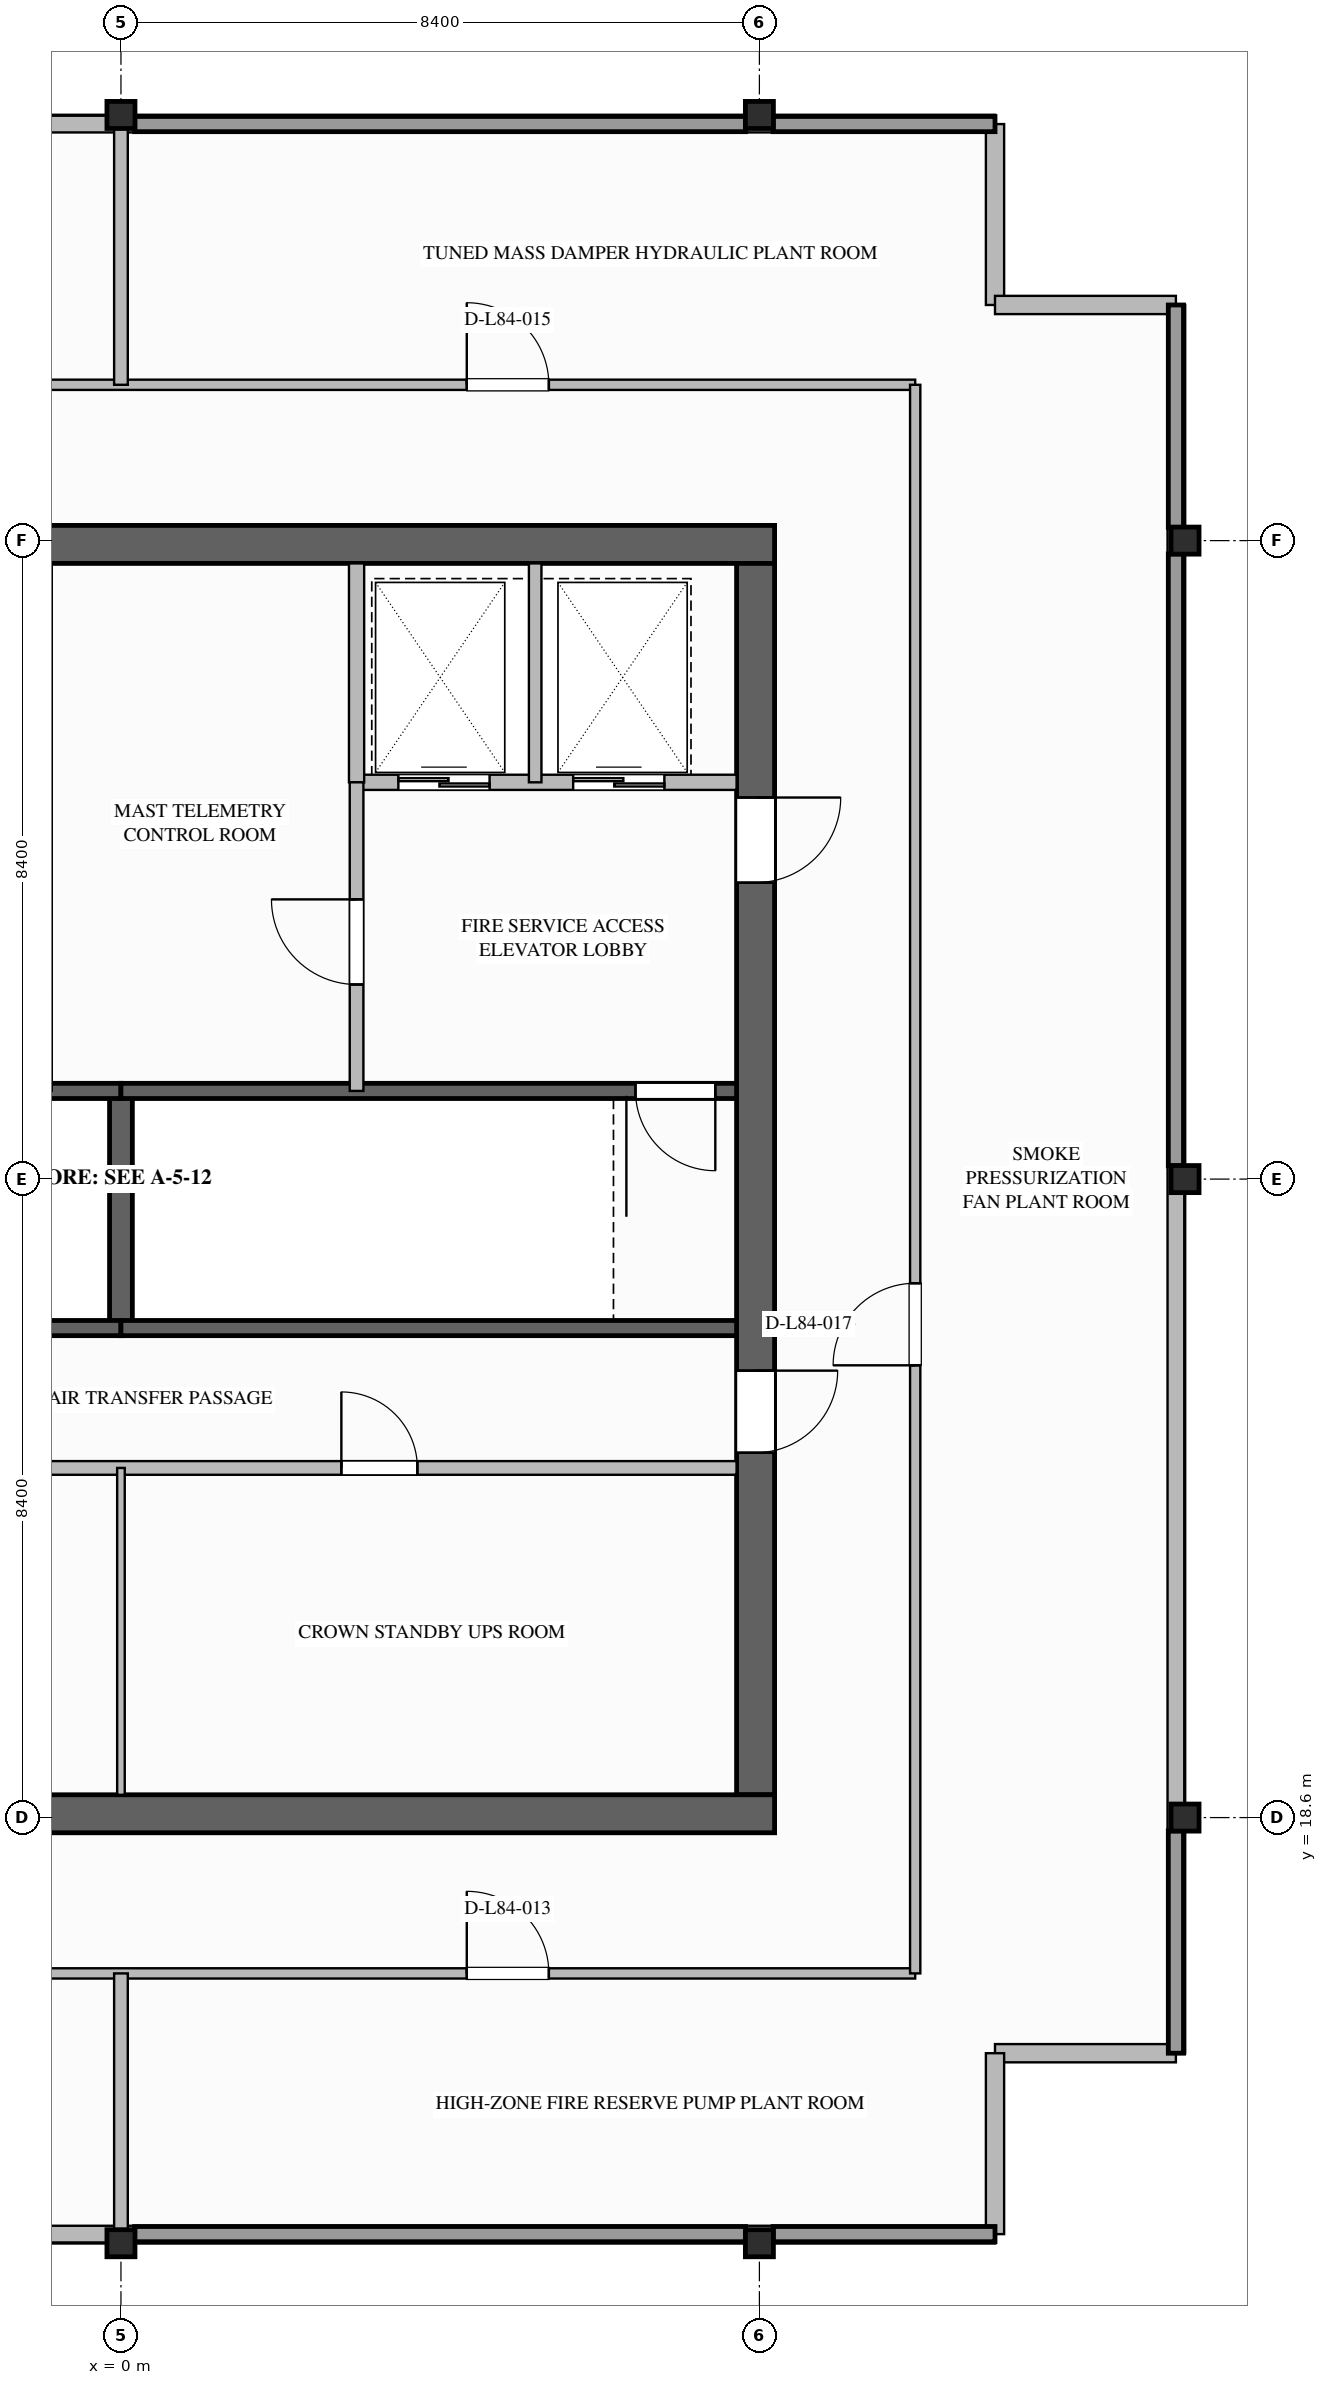
"""IFC4 building model, lengths in metres.
Left out: names, types, materials, properties, quantities, classifications, styles, units other than length and angle.
Written with IfcOpenShell. Run it as: python <this file> out.ifc"""

import sys

from ifc_helpers import new_model, si_unit, direction, frame, frame_2d, origin, origin_2d, place, context, subcontext, project, spatial, rectangle, i_section, extrude, element, fill, save


model = new_model("IFC4")
c1 = context("Model", 3, precision=1e-05, world=origin(), true_north=direction((0.0, 1.0)))
c2 = subcontext(c1, "Body", "Model", "MODEL_VIEW")
j1 = project(units=[si_unit("LENGTHUNIT", "METRE"), si_unit("PLANEANGLEUNIT", "RADIAN")], contexts=[c1])
p1 = place(None, origin())
s1 = spatial("IfcSite", under=j1, at=p1, CompositionType="ELEMENT")
p2 = place(p1, origin())
s2 = spatial("IfcBuilding", under=s1, at=p2, CompositionType="ELEMENT")
p3 = place(p2, frame((0.0, 0.0, 323.2)))
s3 = spatial("IfcBuildingStorey", under=s2, at=p3, CompositionType="ELEMENT", Elevation=323.2)
p4 = place(p3, frame((-8.6, 35.35, 0.0), z_axis=(0.0, 0.0, 1.0), x_axis=(1.0, 0.0, 0.0)))
e1 = element("IfcWall", 1, at=p4, inside=s3, PredefinedType="SHEAR", context=c2, shape_type="SweptSolid", body=[
    extrude(rectangle(XDim=17.2, YDim=0.5, at=frame_2d((8.6, 0.0))), origin(), (0.0, 0.0, 1.0), 3.42),
])
p5 = place(p3, frame((8.35, 35.1, 0.0), z_axis=(0.0, 0.0, 1.0), x_axis=(0.0, -1.0, 0.0)))
e2 = element("IfcWall", 2, at=p5, inside=s3, PredefinedType="SHEAR", context=c2, shape_type="SweptSolid", body=[
    extrude(rectangle(XDim=16.2, YDim=0.5, at=frame_2d((8.1, 0.0))), origin(), (0.0, 0.0, 1.0), 3.42),
])
p6 = place(p5, frame((3.08, 0.0, 0.0)))
e3 = element("IfcOpeningElement", 3, at=p6, cuts=e2, PredefinedType="OPENING", context=c2, shape_type="SweptSolid", body=[
    extrude(rectangle(XDim=1.12, YDim=2.1, at=frame_2d((0.56, 1.05))), frame((0.0, 0.26, 0.0), z_axis=(0.0, -1.0, 0.0), x_axis=(1.0, 0.0, 0.0)), (0.0, 0.0, 1.0), 0.52),
])
p7 = place(p5, frame((10.62, 0.0, 0.0)))
e4 = element("IfcOpeningElement", 4, at=p7, cuts=e2, PredefinedType="OPENING", context=c2, shape_type="SweptSolid", body=[
    extrude(rectangle(XDim=1.08, YDim=2.04, at=frame_2d((0.54, 1.02))), frame((0.0, 0.26, 0.0), z_axis=(0.0, -1.0, 0.0), x_axis=(1.0, 0.0, 0.0)), (0.0, 0.0, 1.0), 0.52),
])
p8 = place(p3, frame((8.6, 18.65, 0.0), z_axis=(0.0, 0.0, 1.0), x_axis=(-1.0, 0.0, 0.0)))
e5 = element("IfcWall", 5, at=p8, inside=s3, PredefinedType="SHEAR", context=c2, shape_type="SweptSolid", body=[
    extrude(rectangle(XDim=17.2, YDim=0.5, at=frame_2d((8.6, 0.0))), origin(), (0.0, 0.0, 1.0), 3.42),
])
for number, where, z_axis, x_axis in (
    (6, (14.0, 18.6, 0.0), (0.0, 0.0, 1.0), (1.0, 0.0, 0.0)),
    (7, (14.0, 27.0, 0.0), (0.0, 0.0, 1.0), (1.0, 0.0, 0.0)),
    (8, (14.0, 35.4, 0.0), (0.0, 0.0, 1.0), (1.0, 0.0, 0.0)),
    (9, (0.0, 13.0, 0.0), (0.0, 0.0, 1.0), (1.0, 0.0, 0.0)),
    (10, (8.4, 13.0, 0.0), (0.0, 0.0, 1.0), (1.0, 0.0, 0.0)),
    (11, (0.0, 41.0, 0.0), (0.0, 0.0, 1.0), (1.0, 0.0, 0.0)),
    (12, (8.4, 41.0, 0.0), (0.0, 0.0, 1.0), (1.0, 0.0, 0.0)),
):
    element("IfcColumn", number, at=place(p3, frame(where, z_axis=z_axis, x_axis=x_axis)), inside=s3, PredefinedType="COLUMN", context=c2, shape_type="SweptSolid", body=[
        extrude(i_section(OverallWidth=0.369, OverallDepth=0.356, WebThickness=0.011, FlangeThickness=0.018, FilletRadius=0.025, at=origin_2d()), origin(), (0.0, 0.0, 1.0), 3.42),
    ])
for number, where, z_axis, x_axis in (
    (13, (11.5, 40.88, 0.0), (0.0, 0.0, 1.0), (0.0, -1.0, 0.0)),
    (14, (11.5, 38.5, 0.0), (0.0, 0.0, 1.0), (1.0, 0.0, 0.0)),
    (15, (13.88, 15.5, 0.0), (0.0, 0.0, 1.0), (-1.0, 0.0, 0.0)),
    (16, (11.5, 15.5, 0.0), (0.0, 0.0, 1.0), (0.0, -1.0, 0.0)),
):
    element("IfcWall", number, at=place(p3, frame(where, z_axis=z_axis, x_axis=x_axis)), inside=s3, PredefinedType="STANDARD", context=c2, shape_type="SweptSolid", body=[
        extrude(rectangle(XDim=2.38, YDim=0.24, at=frame_2d((1.19, 0.0))), origin(), (0.0, 0.0, 1.0), 3.42),
    ])
for number, where, z_axis, x_axis in (
    (17, (11.5, 13.12, 3.8), (0.0, 0.0, 1.0), (-1.0, 0.0, 0.0)),
    (18, (-11.5, 40.88, 3.8), (0.0, 0.0, 1.0), (1.0, 0.0, 0.0)),
    (19, (13.88, 38.5, 3.8), (0.0, 0.0, 1.0), (0.0, -1.0, 0.0)),
):
    element("IfcWall", number, at=place(p3, frame(where, z_axis=z_axis, x_axis=x_axis)), inside=s3, PredefinedType="PARAPET", context=c2, shape_type="SweptSolid", body=[
        extrude(rectangle(XDim=23.0, YDim=0.22, at=frame_2d((11.5, 0.0))), origin(), (0.0, 0.0, 1.0), 0.95),
    ])
p9 = place(p3, frame((0.0, 25.04, 0.0), z_axis=(0.0, 0.0, 1.0), x_axis=(0.0, 1.0, 0.0)))
e20 = element("IfcWall", 20, at=p9, inside=s3, PredefinedType="SOLIDWALL", context=c2, shape_type="SweptSolid", body=[
    extrude(rectangle(XDim=3.12, YDim=0.3, at=frame_2d((1.56, 0.0))), origin(), (0.0, 0.0, 1.0), 3.42),
])
p10 = place(p3, frame((-8.1, 25.04, 0.0), z_axis=(0.0, 0.0, 1.0), x_axis=(1.0, 0.0, 0.0)))
e21 = element("IfcWall", 21, at=p10, inside=s3, PredefinedType="SOLIDWALL", context=c2, shape_type="SweptSolid", body=[
    extrude(rectangle(XDim=8.1, YDim=0.2, at=frame_2d((4.05, 0.0))), origin(), (0.0, 0.0, 1.0), 3.42),
])
p11 = place(p10, frame((0.28, 0.0, 0.0)))
e22 = element("IfcOpeningElement", 22, at=p11, cuts=e21, PredefinedType="OPENING", context=c2, shape_type="SweptSolid", body=[
    extrude(rectangle(XDim=1.05, YDim=2.1, at=frame_2d((0.525, 1.05))), frame((0.0, 0.11, 0.0), z_axis=(0.0, -1.0, 0.0), x_axis=(1.0, 0.0, 0.0)), (0.0, 0.0, 1.0), 0.22),
])
for number, where, z_axis, x_axis in (
    (23, (-8.1, 28.16, 0.0), (0.0, 0.0, 1.0), (1.0, 0.0, 0.0)),
    (24, (0.0, 25.04, 0.0), (0.0, 0.0, 1.0), (1.0, 0.0, 0.0)),
):
    element("IfcWall", number, at=place(p3, frame(where, z_axis=z_axis, x_axis=x_axis)), inside=s3, PredefinedType="SOLIDWALL", context=c2, shape_type="SweptSolid", body=[
        extrude(rectangle(XDim=8.1, YDim=0.2, at=frame_2d((4.05, 0.0))), origin(), (0.0, 0.0, 1.0), 3.42),
    ])
p12 = place(p3, frame((8.1, 28.16, 0.0), z_axis=(0.0, 0.0, 1.0), x_axis=(-1.0, 0.0, 0.0)))
e25 = element("IfcWall", 25, at=p12, inside=s3, PredefinedType="SOLIDWALL", context=c2, shape_type="SweptSolid", body=[
    extrude(rectangle(XDim=8.1, YDim=0.2, at=frame_2d((4.05, 0.0))), origin(), (0.0, 0.0, 1.0), 3.42),
])
p13 = place(p12, frame((0.28, 0.0, 0.0)))
e26 = element("IfcOpeningElement", 26, at=p13, cuts=e25, PredefinedType="OPENING", context=c2, shape_type="SweptSolid", body=[
    extrude(rectangle(XDim=1.05, YDim=2.1, at=frame_2d((0.525, 1.05))), frame((0.0, 0.11, 0.0), z_axis=(0.0, -1.0, 0.0), x_axis=(1.0, 0.0, 0.0)), (0.0, 0.0, 1.0), 0.22),
])
p14 = place(p3, frame((3.1, 32.22, 0.0), z_axis=(0.0, 0.0, 1.0), x_axis=(1.0, 0.0, 0.0)))
e27 = element("IfcWall", 27, at=p14, inside=s3, PredefinedType="SOLIDWALL", context=c2, shape_type="SweptSolid", body=[
    extrude(rectangle(XDim=5.0, YDim=0.2, at=frame_2d((2.5, 0.0))), origin(), (0.0, 0.0, 1.0), 3.42),
])
p15 = place(p14, frame((0.55, 0.0, 0.0)))
e28 = element("IfcOpeningElement", 28, at=p15, cuts=e27, PredefinedType="OPENING", context=c2, shape_type="SweptSolid", body=[
    extrude(rectangle(XDim=1.2, YDim=2.2, at=frame_2d((0.6, 1.1))), frame((0.0, 0.11, 0.0), z_axis=(0.0, -1.0, 0.0), x_axis=(1.0, 0.0, 0.0)), (0.0, 0.0, 1.0), 0.22),
])
p16 = place(p14, frame((2.85, 0.0, 0.0)))
e29 = element("IfcOpeningElement", 29, at=p16, cuts=e27, PredefinedType="OPENING", context=c2, shape_type="SweptSolid", body=[
    extrude(rectangle(XDim=1.2, YDim=2.2, at=frame_2d((0.6, 1.1))), frame((0.0, 0.11, 0.0), z_axis=(0.0, -1.0, 0.0), x_axis=(1.0, 0.0, 0.0)), (0.0, 0.0, 1.0), 0.22),
])
p17 = place(p3, frame((3.1, 32.22, 0.0), z_axis=(0.0, 0.0, 1.0), x_axis=(0.0, 1.0, 0.0)))
e30 = element("IfcWall", 30, at=p17, inside=s3, PredefinedType="SOLIDWALL", context=c2, shape_type="SweptSolid", body=[
    extrude(rectangle(XDim=2.88, YDim=0.2, at=frame_2d((1.44, 0.0))), origin(), (0.0, 0.0, 1.0), 3.42),
])
p18 = place(p3, frame((5.45, 32.22, 0.0), z_axis=(0.0, 0.0, 1.0), x_axis=(0.0, 1.0, 0.0)))
e31 = element("IfcWall", 31, at=p18, inside=s3, PredefinedType="PARTITIONING", context=c2, shape_type="SweptSolid", body=[
    extrude(rectangle(XDim=2.88, YDim=0.165, at=frame_2d((1.44, 0.0))), origin(), (0.0, 0.0, 1.0), 3.42),
])
p19 = place(p3, frame((3.1, 28.16, 0.0), z_axis=(0.0, 0.0, 1.0), x_axis=(0.0, 1.0, 0.0)))
e32 = element("IfcWall", 32, at=p19, inside=s3, PredefinedType="SOLIDWALL", context=c2, shape_type="SweptSolid", body=[
    extrude(rectangle(XDim=4.06, YDim=0.18, at=frame_2d((2.03, 0.0))), origin(), (0.0, 0.0, 1.0), 3.42),
])
p20 = place(p19, frame((1.4, 0.0, 0.0)))
e33 = element("IfcOpeningElement", 33, at=p20, cuts=e32, PredefinedType="OPENING", context=c2, shape_type="SweptSolid", body=[
    extrude(rectangle(XDim=1.12, YDim=2.1, at=frame_2d((0.56, 1.05))), frame((0.0, 0.1, 0.0), z_axis=(0.0, -1.0, 0.0), x_axis=(1.0, 0.0, 0.0)), (0.0, 0.0, 1.0), 0.2),
])
p21 = place(p3, frame((-8.1, 23.2, 0.0), z_axis=(0.0, 0.0, 1.0), x_axis=(1.0, 0.0, 0.0)))
e34 = element("IfcWall", 34, at=p21, inside=s3, PredefinedType="SOLIDWALL", context=c2, shape_type="SweptSolid", body=[
    extrude(rectangle(XDim=16.2, YDim=0.18, at=frame_2d((8.1, 0.0))), origin(), (0.0, 0.0, 1.0), 2.368),
])
p22 = place(p21, frame((2.5, 0.0, 0.0)))
e35 = element("IfcOpeningElement", 35, at=p22, cuts=e34, PredefinedType="OPENING", context=c2, shape_type="SweptSolid", body=[
    extrude(rectangle(XDim=1.0, YDim=2.1, at=frame_2d((0.5, 1.05))), frame((0.0, 0.1, 0.0), z_axis=(0.0, -1.0, 0.0), x_axis=(1.0, 0.0, 0.0)), (0.0, 0.0, 1.0), 0.2),
])
p23 = place(p21, frame((11.0, 0.0, 0.0)))
e36 = element("IfcOpeningElement", 36, at=p23, cuts=e34, PredefinedType="OPENING", context=c2, shape_type="SweptSolid", body=[
    extrude(rectangle(XDim=1.0, YDim=2.1, at=frame_2d((0.5, 1.05))), frame((0.0, 0.1, 0.0), z_axis=(0.0, -1.0, 0.0), x_axis=(1.0, 0.0, 0.0)), (0.0, 0.0, 1.0), 0.2),
])
p24 = place(p3, frame((0.0, 18.9, 0.0), z_axis=(0.0, 0.0, 1.0), x_axis=(0.0, 1.0, 0.0)))
e37 = element("IfcWall", 37, at=p24, inside=s3, PredefinedType="PARTITIONING", context=c2, shape_type="SweptSolid", body=[
    extrude(rectangle(XDim=4.3, YDim=0.1, at=frame_2d((2.15, 0.0))), origin(), (0.0, 0.0, 1.0), 3.42),
])
p25 = place(p3, frame((-10.45, 16.55, 0.0), z_axis=(0.0, 0.0, 1.0), x_axis=(1.0, 0.0, 0.0)))
e38 = element("IfcWall", 38, at=p25, inside=s3, PredefinedType="PARTITIONING", context=c2, shape_type="SweptSolid", body=[
    extrude(rectangle(XDim=20.9, YDim=0.135, at=frame_2d((10.45, 0.0))), origin(), (0.0, 0.0, 1.0), 3.42),
])
p26 = place(p25, frame((3.0, 0.0, 0.0)))
e39 = element("IfcOpeningElement", 39, at=p26, cuts=e38, PredefinedType="OPENING", context=c2, shape_type="SweptSolid", body=[
    extrude(rectangle(XDim=1.08, YDim=2.04, at=frame_2d((0.54, 1.02))), frame((0.0, 0.077, 0.0), z_axis=(0.0, -1.0, 0.0), x_axis=(1.0, 0.0, 0.0)), (0.0, 0.0, 1.0), 0.155),
])
p27 = place(p25, frame((15.0, 0.0, 0.0)))
e40 = element("IfcOpeningElement", 40, at=p27, cuts=e38, PredefinedType="OPENING", context=c2, shape_type="SweptSolid", body=[
    extrude(rectangle(XDim=1.08, YDim=2.04, at=frame_2d((0.54, 1.02))), frame((0.0, 0.077, 0.0), z_axis=(0.0, -1.0, 0.0), x_axis=(1.0, 0.0, 0.0)), (0.0, 0.0, 1.0), 0.155),
])
p28 = place(p3, frame((-10.45, 37.45, 0.0), z_axis=(0.0, 0.0, 1.0), x_axis=(1.0, 0.0, 0.0)))
e41 = element("IfcWall", 41, at=p28, inside=s3, PredefinedType="PARTITIONING", context=c2, shape_type="SweptSolid", body=[
    extrude(rectangle(XDim=20.9, YDim=0.135, at=frame_2d((10.45, 0.0))), origin(), (0.0, 0.0, 1.0), 3.42),
])
p29 = place(p28, frame((3.0, 0.0, 0.0)))
e42 = element("IfcOpeningElement", 42, at=p29, cuts=e41, PredefinedType="OPENING", context=c2, shape_type="SweptSolid", body=[
    extrude(rectangle(XDim=1.08, YDim=2.04, at=frame_2d((0.54, 1.02))), frame((0.0, 0.077, 0.0), z_axis=(0.0, -1.0, 0.0), x_axis=(1.0, 0.0, 0.0)), (0.0, 0.0, 1.0), 0.155),
])
p30 = place(p28, frame((15.0, 0.0, 0.0)))
e43 = element("IfcOpeningElement", 43, at=p30, cuts=e41, PredefinedType="OPENING", context=c2, shape_type="SweptSolid", body=[
    extrude(rectangle(XDim=1.08, YDim=2.04, at=frame_2d((0.54, 1.02))), frame((0.0, 0.077, 0.0), z_axis=(0.0, -1.0, 0.0), x_axis=(1.0, 0.0, 0.0)), (0.0, 0.0, 1.0), 0.155),
])
p31 = place(p3, frame((10.45, 16.55, 0.0), z_axis=(0.0, 0.0, 1.0), x_axis=(0.0, 1.0, 0.0)))
e44 = element("IfcWall", 44, at=p31, inside=s3, PredefinedType="PARTITIONING", context=c2, shape_type="SweptSolid", body=[
    extrude(rectangle(XDim=20.9, YDim=0.135, at=frame_2d((10.45, 0.0))), origin(), (0.0, 0.0, 1.0), 3.42),
])
p32 = place(p31, frame((8.0, 0.0, 0.0)))
e45 = element("IfcOpeningElement", 45, at=p32, cuts=e44, PredefinedType="OPENING", context=c2, shape_type="SweptSolid", body=[
    extrude(rectangle(XDim=1.08, YDim=2.04, at=frame_2d((0.54, 1.02))), frame((0.0, 0.077, 0.0), z_axis=(0.0, -1.0, 0.0), x_axis=(1.0, 0.0, 0.0)), (0.0, 0.0, 1.0), 0.155),
])
for number, where, z_axis, x_axis in (
    (46, (0.0, 13.12, 0.0), (0.0, 0.0, 1.0), (0.0, 1.0, 0.0)),
    (47, (0.0, 37.45, 0.0), (0.0, 0.0, 1.0), (0.0, 1.0, 0.0)),
):
    element("IfcWall", number, at=place(p3, frame(where, z_axis=z_axis, x_axis=x_axis)), inside=s3, PredefinedType="SOLIDWALL", context=c2, shape_type="SweptSolid", body=[
        extrude(rectangle(XDim=3.43, YDim=0.18, at=frame_2d((1.715, 0.0))), origin(), (0.0, 0.0, 1.0), 2.868),
    ])
p33 = place(p13, origin())
e48 = element("IfcDoor", 48, at=p33, inside=s3, OperationType="SINGLE_SWING_LEFT", PredefinedType="DOOR", context=c2, shape_type="SweptSolid", body=[
    extrude(rectangle(XDim=1.05, YDim=2.1, at=frame_2d((0.525, 1.05))), frame((0.0, 0.025, 0.0), z_axis=(0.0, -1.0, 0.0), x_axis=(1.0, 0.0, 0.0)), (0.0, 0.0, 1.0), 0.05),
])
fill(e26, e48)
p34 = place(p15, origin())
e49 = element("IfcDoor", 49, at=p34, inside=s3, OperationType="SLIDING_TO_LEFT", PredefinedType="DOOR", context=c2, shape_type="SweptSolid", body=[
    extrude(rectangle(XDim=1.2, YDim=2.2, at=frame_2d((0.6, 1.1))), frame((0.0, 0.025, 0.0), z_axis=(0.0, -1.0, 0.0), x_axis=(1.0, 0.0, 0.0)), (0.0, 0.0, 1.0), 0.05),
])
fill(e28, e49)
p35 = place(p16, origin())
e50 = element("IfcDoor", 50, at=p35, inside=s3, OperationType="SLIDING_TO_LEFT", PredefinedType="DOOR", context=c2, shape_type="SweptSolid", body=[
    extrude(rectangle(XDim=1.2, YDim=2.2, at=frame_2d((0.6, 1.1))), frame((0.0, 0.025, 0.0), z_axis=(0.0, -1.0, 0.0), x_axis=(1.0, 0.0, 0.0)), (0.0, 0.0, 1.0), 0.05),
])
fill(e29, e50)
p36 = place(p20, origin())
e51 = element("IfcDoor", 51, at=p36, inside=s3, OperationType="SINGLE_SWING_RIGHT", PredefinedType="DOOR", context=c2, shape_type="SweptSolid", body=[
    extrude(rectangle(XDim=1.12, YDim=2.1, at=frame_2d((0.56, 1.05))), frame((0.0, 0.025, 0.0), z_axis=(0.0, -1.0, 0.0), x_axis=(1.0, 0.0, 0.0)), (0.0, 0.0, 1.0), 0.05),
])
fill(e33, e51)
p37 = place(p6, origin())
e52 = element("IfcDoor", 52, at=p37, inside=s3, OperationType="SINGLE_SWING_LEFT", PredefinedType="DOOR", context=c2, shape_type="SweptSolid", body=[
    extrude(rectangle(XDim=1.12, YDim=2.1, at=frame_2d((0.56, 1.05))), frame((0.0, 0.025, 0.0), z_axis=(0.0, -1.0, 0.0), x_axis=(1.0, 0.0, 0.0)), (0.0, 0.0, 1.0), 0.05),
])
fill(e3, e52)
p38 = place(p7, origin())
e53 = element("IfcDoor", 53, at=p38, inside=s3, OperationType="SINGLE_SWING_LEFT", PredefinedType="DOOR", context=c2, shape_type="SweptSolid", body=[
    extrude(rectangle(XDim=1.08, YDim=2.04, at=frame_2d((0.54, 1.02))), frame((0.0, 0.025, 0.0), z_axis=(0.0, -1.0, 0.0), x_axis=(1.0, 0.0, 0.0)), (0.0, 0.0, 1.0), 0.05),
])
fill(e4, e53)
p39 = place(p23, origin())
e54 = element("IfcDoor", 54, at=p39, inside=s3, OperationType="SINGLE_SWING_LEFT", PredefinedType="DOOR", context=c2, shape_type="SweptSolid", body=[
    extrude(rectangle(XDim=1.0, YDim=2.1, at=frame_2d((0.5, 1.05))), frame((0.0, 0.025, 0.0), z_axis=(0.0, -1.0, 0.0), x_axis=(1.0, 0.0, 0.0)), (0.0, 0.0, 1.0), 0.05),
])
fill(e36, e54)
p40 = place(p27, origin())
e55 = element("IfcDoor", 55, at=p40, inside=s3, OperationType="SINGLE_SWING_LEFT", PredefinedType="DOOR", context=c2, shape_type="SweptSolid", body=[
    extrude(rectangle(XDim=1.08, YDim=2.04, at=frame_2d((0.54, 1.02))), frame((0.0, 0.025, 0.0), z_axis=(0.0, -1.0, 0.0), x_axis=(1.0, 0.0, 0.0)), (0.0, 0.0, 1.0), 0.05),
])
fill(e40, e55)
p41 = place(p30, origin())
e56 = element("IfcDoor", 56, at=p41, inside=s3, OperationType="SINGLE_SWING_LEFT", PredefinedType="DOOR", context=c2, shape_type="SweptSolid", body=[
    extrude(rectangle(XDim=1.08, YDim=2.04, at=frame_2d((0.54, 1.02))), frame((0.0, 0.025, 0.0), z_axis=(0.0, -1.0, 0.0), x_axis=(1.0, 0.0, 0.0)), (0.0, 0.0, 1.0), 0.05),
])
fill(e43, e56)
p42 = place(p32, origin())
e57 = element("IfcDoor", 57, at=p42, inside=s3, OperationType="SINGLE_SWING_LEFT", PredefinedType="DOOR", context=c2, shape_type="SweptSolid", body=[
    extrude(rectangle(XDim=1.08, YDim=2.04, at=frame_2d((0.54, 1.02))), frame((0.0, 0.025, 0.0), z_axis=(0.0, -1.0, 0.0), x_axis=(1.0, 0.0, 0.0)), (0.0, 0.0, 1.0), 0.05),
])
fill(e45, e57)
save(model, sys.argv[1])
